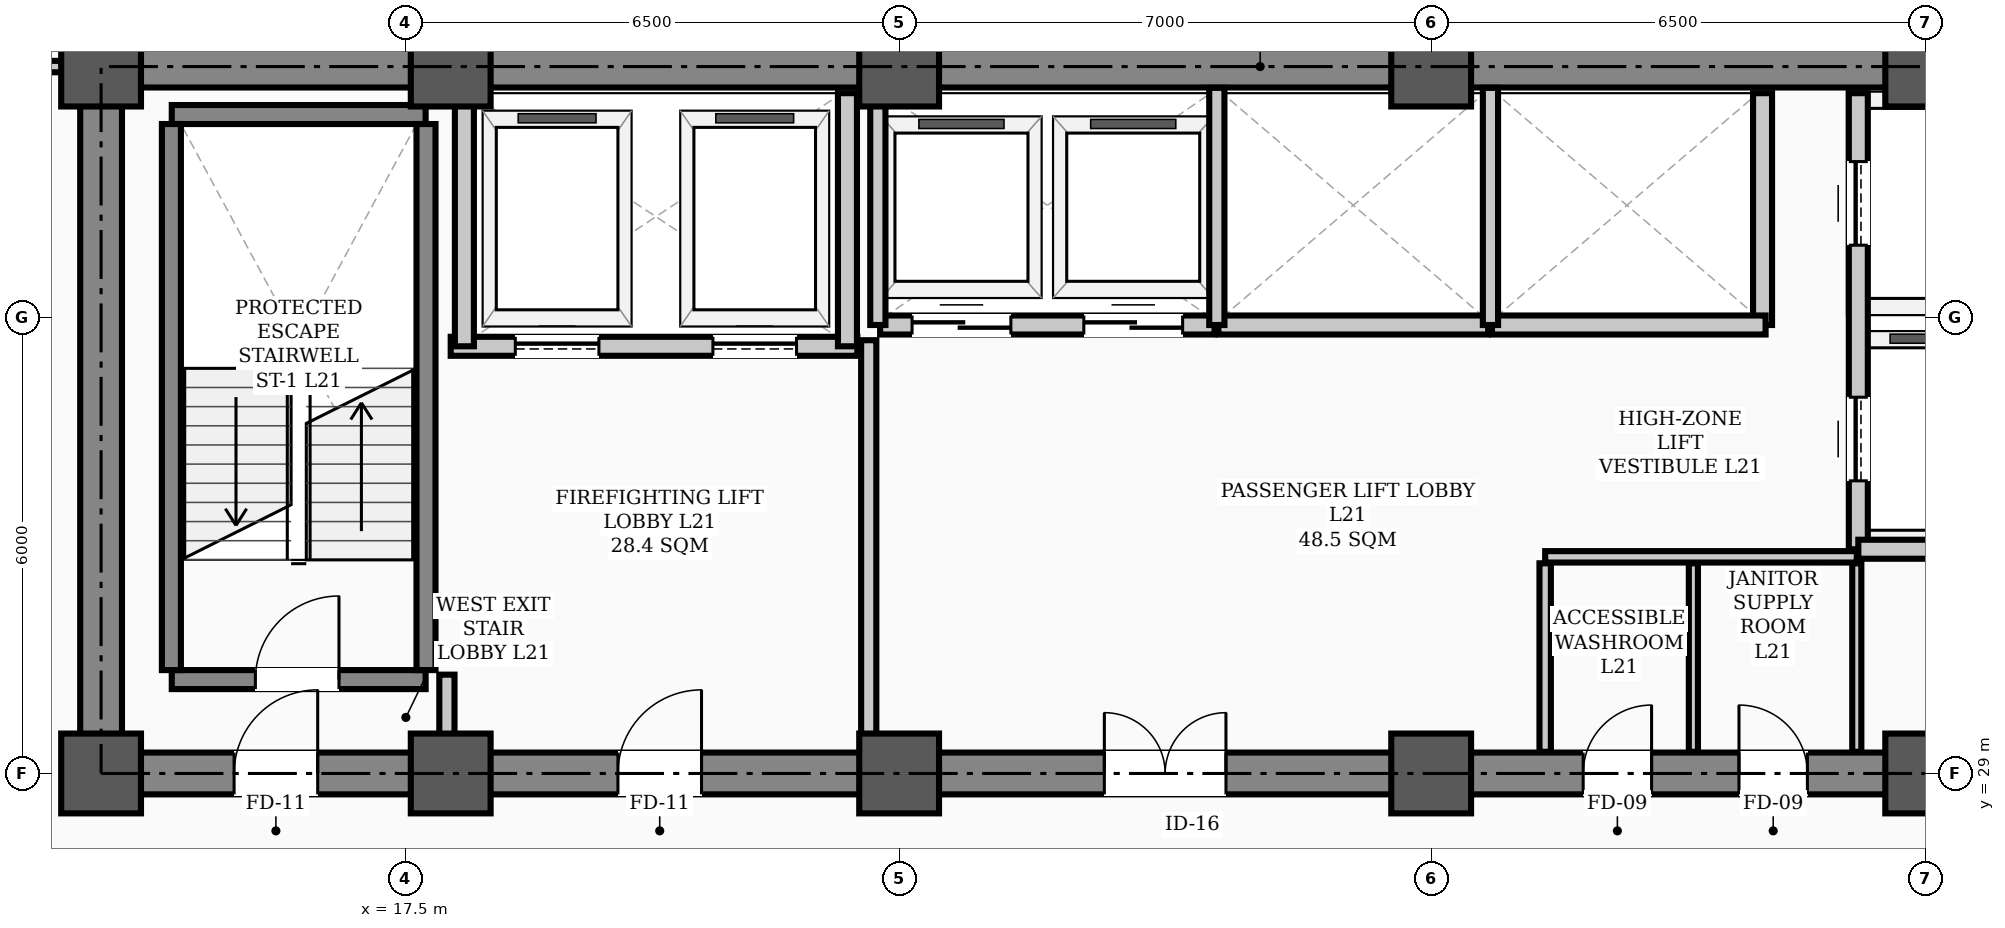
"""IFC4 building model, lengths in metres.
Left out: names, types, materials, properties, quantities, classifications, styles, units other than length and angle.
Written with IfcOpenShell. Run it as: python <this file> out.ifc"""

import sys

from ifc_helpers import new_model, si_unit, direction, frame, frame_2d, origin, origin_2d, place, context, subcontext, project, spatial, rectangle, hollow_rectangle, extrude, element, fill, save


model = new_model("IFC4")
c1 = context("Model", 3, precision=1e-05, world=origin(), true_north=direction((0.0, 1.0)))
c2 = subcontext(c1, "Body", "Model", "MODEL_VIEW")
j1 = project(units=[si_unit("LENGTHUNIT", "METRE"), si_unit("PLANEANGLEUNIT", "RADIAN")], contexts=[c1])
p1 = place(None, origin())
s1 = spatial("IfcSite", under=j1, at=p1, CompositionType="ELEMENT")
p2 = place(p1, origin())
s2 = spatial("IfcBuilding", under=s1, at=p2, CompositionType="ELEMENT")
p3 = place(p2, frame((0.0, 0.0, 85.0)))
s3 = spatial("IfcBuildingStorey", under=s2, at=p3, CompositionType="ELEMENT", Elevation=85.0)
for number, where, z_axis, x_axis in (
    (1, (13.5, 29.0, 0.0), (0.0, 0.0, 1.0), (1.0, 0.0, 0.0)),
    (2, (13.5, 38.3, 0.0), (0.0, 0.0, 1.0), (1.0, 0.0, 0.0)),
    (3, (18.1, 29.0, 0.0), (0.0, 0.0, 1.0), (1.0, 0.0, 0.0)),
    (4, (18.1, 38.3, 0.0), (0.0, 0.0, 1.0), (1.0, 0.0, 0.0)),
    (5, (24.0, 29.0, 0.0), (0.0, 0.0, 1.0), (1.0, 0.0, 0.0)),
    (6, (24.0, 38.3, 0.0), (0.0, 0.0, 1.0), (1.0, 0.0, 0.0)),
    (7, (31.0, 29.0, 0.0), (0.0, 0.0, 1.0), (1.0, 0.0, 0.0)),
    (8, (31.0, 38.3, 0.0), (0.0, 0.0, 1.0), (1.0, 0.0, 0.0)),
    (9, (37.5, 29.0, 0.0), (0.0, 0.0, 1.0), (1.0, 0.0, 0.0)),
    (10, (37.5, 38.3, 0.0), (0.0, 0.0, 1.0), (1.0, 0.0, 0.0)),
):
    element("IfcColumn", number, at=place(p3, frame(where, z_axis=z_axis, x_axis=x_axis)), inside=s3, PredefinedType="COLUMN", context=c2, shape_type="SweptSolid", body=[
        extrude(hollow_rectangle(XDim=1.05, YDim=1.05, WallThickness=0.038, InnerFilletRadius=0.019, OuterFilletRadius=0.057, at=origin_2d()), origin(), (0.0, 0.0, 1.0), 3.9),
    ])
p4 = place(p3, frame((13.5, 29.0, 0.0), z_axis=(0.0, 0.0, 1.0), x_axis=(1.0, 0.0, 0.0)))
e11 = element("IfcWall", 11, at=p4, inside=s3, PredefinedType="SHEAR", context=c2, shape_type="SweptSolid", body=[
    extrude(rectangle(XDim=30.5, YDim=0.55, at=frame_2d((15.25, 0.0))), origin(), (0.0, 0.0, 1.0), 3.72),
])
p5 = place(p4, frame((1.75, 0.0, 0.0)))
e12 = element("IfcOpeningElement", 12, at=p5, cuts=e11, PredefinedType="OPENING", context=c2, shape_type="SweptSolid", body=[
    extrude(rectangle(XDim=1.1, YDim=2.08, at=frame_2d((0.55, 1.04))), frame((0.0, 0.285, 0.0), z_axis=(0.0, -1.0, 0.0), x_axis=(1.0, 0.0, 0.0)), (0.0, 0.0, 1.0), 0.57),
])
p6 = place(p4, frame((26.7, 0.0, 0.0)))
e13 = element("IfcOpeningElement", 13, at=p6, cuts=e11, PredefinedType="OPENING", context=c2, shape_type="SweptSolid", body=[
    extrude(rectangle(XDim=1.1, YDim=2.08, at=frame_2d((0.55, 1.04))), frame((0.0, 0.285, 0.0), z_axis=(0.0, -1.0, 0.0), x_axis=(1.0, 0.0, 0.0)), (0.0, 0.0, 1.0), 0.57),
])
p7 = place(p4, frame((6.8, 0.0, 0.0)))
e14 = element("IfcOpeningElement", 14, at=p7, cuts=e11, PredefinedType="OPENING", context=c2, shape_type="SweptSolid", body=[
    extrude(rectangle(XDim=1.1, YDim=2.08, at=frame_2d((0.55, 1.04))), frame((0.0, 0.285, 0.0), z_axis=(0.0, -1.0, 0.0), x_axis=(1.0, 0.0, 0.0)), (0.0, 0.0, 1.0), 0.57),
])
p8 = place(p4, frame((13.2, 0.0, 0.0)))
e15 = element("IfcOpeningElement", 15, at=p8, cuts=e11, PredefinedType="OPENING", context=c2, shape_type="SweptSolid", body=[
    extrude(rectangle(XDim=1.6, YDim=2.08, at=frame_2d((0.8, 1.04))), frame((0.0, 0.285, 0.0), z_axis=(0.0, -1.0, 0.0), x_axis=(1.0, 0.0, 0.0)), (0.0, 0.0, 1.0), 0.57),
])
p9 = place(p4, frame((19.5, 0.0, 0.0)))
e16 = element("IfcOpeningElement", 16, at=p9, cuts=e11, PredefinedType="OPENING", context=c2, shape_type="SweptSolid", body=[
    extrude(rectangle(XDim=0.9, YDim=2.08, at=frame_2d((0.45, 1.04))), frame((0.0, 0.285, 0.0), z_axis=(0.0, -1.0, 0.0), x_axis=(1.0, 0.0, 0.0)), (0.0, 0.0, 1.0), 0.57),
])
p10 = place(p4, frame((21.55, 0.0, 0.0)))
e17 = element("IfcOpeningElement", 17, at=p10, cuts=e11, PredefinedType="OPENING", context=c2, shape_type="SweptSolid", body=[
    extrude(rectangle(XDim=0.9, YDim=2.08, at=frame_2d((0.45, 1.04))), frame((0.0, 0.285, 0.0), z_axis=(0.0, -1.0, 0.0), x_axis=(1.0, 0.0, 0.0)), (0.0, 0.0, 1.0), 0.57),
])
p11 = place(p3, frame((13.5, 38.3, 0.0), z_axis=(0.0, 0.0, 1.0), x_axis=(1.0, 0.0, 0.0)))
e18 = element("IfcWall", 18, at=p11, inside=s3, PredefinedType="SHEAR", context=c2, shape_type="SweptSolid", body=[
    extrude(rectangle(XDim=30.5, YDim=0.55, at=frame_2d((15.25, 0.0))), origin(), (0.0, 0.0, 1.0), 3.72),
])
p12 = place(p3, frame((13.5, 29.35, 0.0), z_axis=(0.0, 0.0, 1.0), x_axis=(0.0, 1.0, 0.0)))
e19 = element("IfcWall", 19, at=p12, inside=s3, PredefinedType="SHEAR", context=c2, shape_type="SweptSolid", body=[
    extrude(rectangle(XDim=8.6, YDim=0.55, at=frame_2d((4.3, 0.0))), origin(), (0.0, 0.0, 1.0), 3.72),
])
p13 = place(p3, frame((14.43, 30.235, 0.0), z_axis=(0.0, 0.0, 1.0), x_axis=(1.0, 0.0, 0.0)))
e20 = element("IfcWall", 20, at=p13, inside=s3, PredefinedType="STANDARD", context=c2, shape_type="SweptSolid", body=[
    extrude(rectangle(XDim=3.34, YDim=0.25, at=frame_2d((1.67, 0.0))), origin(), (0.0, 0.0, 1.0), 3.72),
])
p14 = place(p13, frame((1.1, 0.0, 0.0)))
e21 = element("IfcOpeningElement", 21, at=p14, cuts=e20, PredefinedType="OPENING", context=c2, shape_type="SweptSolid", body=[
    extrude(rectangle(XDim=1.1, YDim=2.08, at=frame_2d((0.55, 1.04))), frame((0.0, 0.135, 0.0), z_axis=(0.0, -1.0, 0.0), x_axis=(1.0, 0.0, 0.0)), (0.0, 0.0, 1.0), 0.27),
])
p15 = place(p3, frame((14.43, 37.669, 0.0), z_axis=(0.0, 0.0, 1.0), x_axis=(1.0, 0.0, 0.0)))
e22 = element("IfcWall", 22, at=p15, inside=s3, PredefinedType="STANDARD", context=c2, shape_type="SweptSolid", body=[
    extrude(rectangle(XDim=3.34, YDim=0.25, at=frame_2d((1.67, 0.0))), origin(), (0.0, 0.0, 1.0), 3.72),
])
for number, where, z_axis, x_axis in (
    (23, (14.425, 30.36, 0.0), (0.0, 0.0, 1.0), (0.0, 1.0, 0.0)),
    (24, (17.775, 30.36, 0.0), (0.0, 0.0, 1.0), (0.0, 1.0, 0.0)),
):
    element("IfcWall", number, at=place(p3, frame(where, z_axis=z_axis, x_axis=x_axis)), inside=s3, PredefinedType="STANDARD", context=c2, shape_type="SweptSolid", body=[
        extrude(rectangle(XDim=7.184, YDim=0.25, at=frame_2d((3.592, 0.0))), origin(), (0.0, 0.0, 1.0), 3.72),
    ])
p16 = place(p3, frame((18.1, 34.62, 0.0), z_axis=(0.0, 0.0, 1.0), x_axis=(1.0, 0.0, 0.0)))
e25 = element("IfcWall", 25, at=p16, inside=s3, PredefinedType="STANDARD", context=c2, shape_type="SweptSolid", body=[
    extrude(rectangle(XDim=5.35, YDim=0.25, at=frame_2d((2.675, 0.0))), origin(), (0.0, 0.0, 1.0), 3.72),
])
p17 = place(p16, frame((0.85, 0.0, 0.0)))
e26 = element("IfcOpeningElement", 26, at=p17, cuts=e25, PredefinedType="OPENING", context=c2, shape_type="SweptSolid", body=[
    extrude(rectangle(XDim=1.1, YDim=2.08, at=frame_2d((0.55, 1.04))), frame((0.0, 0.135, 0.0), z_axis=(0.0, -1.0, 0.0), x_axis=(1.0, 0.0, 0.0)), (0.0, 0.0, 1.0), 0.27),
])
p18 = place(p16, frame((3.45, 0.0, 0.0)))
e27 = element("IfcOpeningElement", 27, at=p18, cuts=e25, PredefinedType="OPENING", context=c2, shape_type="SweptSolid", body=[
    extrude(rectangle(XDim=1.1, YDim=2.08, at=frame_2d((0.55, 1.04))), frame((0.0, 0.135, 0.0), z_axis=(0.0, -1.0, 0.0), x_axis=(1.0, 0.0, 0.0)), (0.0, 0.0, 1.0), 0.27),
])
p19 = place(p3, frame((36.62, 31.95, 0.0), z_axis=(0.0, 0.0, 1.0), x_axis=(0.0, 1.0, 0.0)))
e28 = element("IfcWall", 28, at=p19, inside=s3, PredefinedType="STANDARD", context=c2, shape_type="SweptSolid", body=[
    extrude(rectangle(XDim=6.0, YDim=0.25, at=frame_2d((3.0, 0.0))), origin(), (0.0, 0.0, 1.0), 3.3),
])
p20 = place(p19, frame((0.9, 0.0, 0.0)))
e29 = element("IfcOpeningElement", 29, at=p20, cuts=e28, PredefinedType="OPENING", context=c2, shape_type="SweptSolid", body=[
    extrude(rectangle(XDim=1.1, YDim=2.08, at=frame_2d((0.55, 1.04))), frame((0.0, 0.135, 0.0), z_axis=(0.0, -1.0, 0.0), x_axis=(1.0, 0.0, 0.0)), (0.0, 0.0, 1.0), 0.27),
])
p21 = place(p19, frame((4.0, 0.0, 0.0)))
e30 = element("IfcOpeningElement", 30, at=p21, cuts=e28, PredefinedType="OPENING", context=c2, shape_type="SweptSolid", body=[
    extrude(rectangle(XDim=1.1, YDim=2.08, at=frame_2d((0.55, 1.04))), frame((0.0, 0.135, 0.0), z_axis=(0.0, -1.0, 0.0), x_axis=(1.0, 0.0, 0.0)), (0.0, 0.0, 1.0), 0.27),
])
p22 = place(p3, frame((36.62, 31.95, 0.0), z_axis=(0.0, 0.0, 1.0), x_axis=(1.0, 0.0, 0.0)))
e31 = element("IfcWall", 31, at=p22, inside=s3, PredefinedType="STANDARD", context=c2, shape_type="SweptSolid", body=[
    extrude(rectangle(XDim=1.9, YDim=0.25, at=frame_2d((0.95, 0.0))), origin(), (0.0, 0.0, 1.0), 3.48),
])
for number, where, z_axis, x_axis in (
    (32, (18.28, 34.62, 0.0), (0.0, 0.0, 1.0), (0.0, 1.0, 0.0)),
    (33, (23.32, 34.62, 0.0), (0.0, 0.0, 1.0), (0.0, 1.0, 0.0)),
):
    element("IfcWall", number, at=place(p3, frame(where, z_axis=z_axis, x_axis=x_axis)), inside=s3, PredefinedType="STANDARD", context=c2, shape_type="SweptSolid", body=[
        extrude(rectangle(XDim=3.33, YDim=0.25, at=frame_2d((1.665, 0.0))), origin(), (0.0, 0.0, 1.0), 3.3),
    ])
p23 = place(p3, frame((35.36, 34.9, 0.0), z_axis=(0.0, 0.0, 1.0), x_axis=(0.0, 1.0, 0.0)))
e34 = element("IfcWall", 34, at=p23, inside=s3, PredefinedType="STANDARD", context=c2, shape_type="SweptSolid", body=[
    extrude(rectangle(XDim=3.05, YDim=0.25, at=frame_2d((1.525, 0.0))), origin(), (0.0, 0.0, 1.0), 3.3),
])
p24 = place(p3, frame((23.75, 34.9, 0.0), z_axis=(0.0, 0.0, 1.0), x_axis=(1.0, 0.0, 0.0)))
e35 = element("IfcWall", 35, at=p24, inside=s3, PredefinedType="STANDARD", context=c2, shape_type="SweptSolid", body=[
    extrude(rectangle(XDim=4.4, YDim=0.25, at=frame_2d((2.2, 0.0))), origin(), (0.0, 0.0, 1.0), 3.72),
])
p25 = place(p24, frame((0.42, 0.0, 0.0)))
e36 = element("IfcOpeningElement", 36, at=p25, cuts=e35, PredefinedType="OPENING", context=c2, shape_type="SweptSolid", body=[
    extrude(rectangle(XDim=1.3, YDim=2.08, at=frame_2d((0.65, 1.04))), frame((0.0, 0.135, 0.0), z_axis=(0.0, -1.0, 0.0), x_axis=(1.0, 0.0, 0.0)), (0.0, 0.0, 1.0), 0.27),
])
p26 = place(p24, frame((2.68, 0.0, 0.0)))
e37 = element("IfcOpeningElement", 37, at=p26, cuts=e35, PredefinedType="OPENING", context=c2, shape_type="SweptSolid", body=[
    extrude(rectangle(XDim=1.3, YDim=2.08, at=frame_2d((0.65, 1.04))), frame((0.0, 0.135, 0.0), z_axis=(0.0, -1.0, 0.0), x_axis=(1.0, 0.0, 0.0)), (0.0, 0.0, 1.0), 0.27),
])
p27 = place(p3, frame((28.2, 34.9, 0.0), z_axis=(0.0, 0.0, 1.0), x_axis=(1.0, 0.0, 0.0)))
e38 = element("IfcWall", 38, at=p27, inside=s3, PredefinedType="STANDARD", context=c2, shape_type="SweptSolid", body=[
    extrude(rectangle(XDim=3.55, YDim=0.25, at=frame_2d((1.775, 0.0))), origin(), (0.0, 0.0, 1.0), 3.72),
])
p28 = place(p3, frame((31.8, 34.9, 0.0), z_axis=(0.0, 0.0, 1.0), x_axis=(1.0, 0.0, 0.0)))
e39 = element("IfcWall", 39, at=p28, inside=s3, PredefinedType="STANDARD", context=c2, shape_type="SweptSolid", body=[
    extrude(rectangle(XDim=3.6, YDim=0.25, at=frame_2d((1.8, 0.0))), origin(), (0.0, 0.0, 1.0), 3.72),
])
p29 = place(p3, frame((32.5, 31.85, 0.0), z_axis=(0.0, 0.0, 1.0), x_axis=(1.0, 0.0, 0.0)))
e40 = element("IfcWall", 40, at=p29, inside=s3, PredefinedType="PARTITIONING", context=c2, shape_type="SweptSolid", body=[
    extrude(rectangle(XDim=4.1, YDim=0.15, at=frame_2d((2.05, 0.0))), origin(), (0.0, 0.0, 1.0), 3.72),
])
p30 = place(p3, frame((7.81, 38.3, 0.0), z_axis=(0.0, 0.0, 1.0), x_axis=(1.0, 0.0, 0.0)))
e41 = element("IfcWall", 41, at=p30, inside=s3, PredefinedType="PARTITIONING", context=c2, shape_type="SweptSolid", body=[
    extrude(rectangle(XDim=5.69, YDim=0.15, at=frame_2d((2.845, 0.0))), origin(), (0.0, 0.0, 1.0), 3.0),
])
p31 = place(p3, frame((18.05, 29.285, 0.0), z_axis=(0.0, 0.0, 1.0), x_axis=(0.0, 1.0, 0.0)))
e42 = element("IfcWall", 42, at=p31, inside=s3, PredefinedType="STANDARD", context=c2, shape_type="SweptSolid", body=[
    extrude(rectangle(XDim=1.015, YDim=0.2, at=frame_2d((0.508, 0.0))), origin(), (0.0, 0.0, 1.0), 3.3),
])
p32 = place(p3, frame((23.6, 29.285, 0.0), z_axis=(0.0, 0.0, 1.0), x_axis=(0.0, 1.0, 0.0)))
e43 = element("IfcWall", 43, at=p32, inside=s3, PredefinedType="STANDARD", context=c2, shape_type="SweptSolid", body=[
    extrude(rectangle(XDim=5.415, YDim=0.2, at=frame_2d((2.708, 0.0))), origin(), (0.0, 0.0, 1.0), 3.1),
])
p33 = place(p3, frame((32.5, 29.285, 0.0), z_axis=(0.0, 0.0, 1.0), x_axis=(0.0, 1.0, 0.0)))
e44 = element("IfcWall", 44, at=p33, inside=s3, PredefinedType="PARTITIONING", context=c2, shape_type="SweptSolid", body=[
    extrude(rectangle(XDim=2.48, YDim=0.15, at=frame_2d((1.24, 0.0))), origin(), (0.0, 0.0, 1.0), 3.3),
])
for number, where, z_axis, x_axis in (
    (45, (36.6, 29.285, 0.0), (0.0, 0.0, 1.0), (0.0, 1.0, 0.0)),
    (46, (34.45, 29.285, 0.0), (0.0, 0.0, 1.0), (0.0, 1.0, 0.0)),
):
    element("IfcWall", number, at=place(p3, frame(where, z_axis=z_axis, x_axis=x_axis)), inside=s3, PredefinedType="PARTITIONING", context=c2, shape_type="SweptSolid", body=[
        extrude(rectangle(XDim=2.48, YDim=0.12, at=frame_2d((1.24, 0.0))), origin(), (0.0, 0.0, 1.0), 3.3),
    ])
p34 = place(p3, frame((23.72, 34.9, 0.0), z_axis=(0.0, 0.0, 1.0), x_axis=(0.0, 1.0, 0.0)))
e47 = element("IfcWall", 47, at=p34, inside=s3, PredefinedType="STANDARD", context=c2, shape_type="SweptSolid", body=[
    extrude(rectangle(XDim=3.12, YDim=0.2, at=frame_2d((1.56, 0.0))), origin(), (0.0, 0.0, 1.0), 3.1),
])
for number, where, z_axis, x_axis in (
    (48, (28.18, 34.9, 0.0), (0.0, 0.0, 1.0), (0.0, 1.0, 0.0)),
    (49, (31.78, 34.9, 0.0), (0.0, 0.0, 1.0), (0.0, 1.0, 0.0)),
):
    element("IfcWall", number, at=place(p3, frame(where, z_axis=z_axis, x_axis=x_axis)), inside=s3, PredefinedType="STANDARD", context=c2, shape_type="SweptSolid", body=[
        extrude(rectangle(XDim=3.12, YDim=0.2, at=frame_2d((1.56, 0.0))), origin(), (0.0, 0.0, 1.0), 3.3),
    ])
p35 = place(p14, origin())
e50 = element("IfcDoor", 50, at=p35, inside=s3, OperationType="SINGLE_SWING_RIGHT", PredefinedType="DOOR", context=c2, shape_type="SweptSolid", body=[
    extrude(rectangle(XDim=1.1, YDim=2.08, at=frame_2d((0.55, 1.04))), frame((0.0, 0.025, 0.0), z_axis=(0.0, -1.0, 0.0), x_axis=(1.0, 0.0, 0.0)), (0.0, 0.0, 1.0), 0.05),
])
fill(e21, e50)
p36 = place(p5, origin())
e51 = element("IfcDoor", 51, at=p36, inside=s3, OperationType="SINGLE_SWING_RIGHT", PredefinedType="DOOR", context=c2, shape_type="SweptSolid", body=[
    extrude(rectangle(XDim=1.1, YDim=2.08, at=frame_2d((0.55, 1.04))), frame((0.0, 0.025, 0.0), z_axis=(0.0, -1.0, 0.0), x_axis=(1.0, 0.0, 0.0)), (0.0, 0.0, 1.0), 0.05),
])
fill(e12, e51)
p37 = place(p7, origin())
e52 = element("IfcDoor", 52, at=p37, inside=s3, OperationType="SINGLE_SWING_RIGHT", PredefinedType="DOOR", context=c2, shape_type="SweptSolid", body=[
    extrude(rectangle(XDim=1.1, YDim=2.08, at=frame_2d((0.55, 1.04))), frame((0.0, 0.025, 0.0), z_axis=(0.0, -1.0, 0.0), x_axis=(1.0, 0.0, 0.0)), (0.0, 0.0, 1.0), 0.05),
])
fill(e14, e52)
p38 = place(p8, origin())
e53 = element("IfcDoor", 53, at=p38, inside=s3, OperationType="DOUBLE_DOOR_SINGLE_SWING", PredefinedType="DOOR", context=c2, shape_type="SweptSolid", body=[
    extrude(rectangle(XDim=1.6, YDim=2.08, at=frame_2d((0.8, 1.04))), frame((0.0, 0.025, 0.0), z_axis=(0.0, -1.0, 0.0), x_axis=(1.0, 0.0, 0.0)), (0.0, 0.0, 1.0), 0.05),
])
fill(e15, e53)
p39 = place(p9, origin())
e54 = element("IfcDoor", 54, at=p39, inside=s3, OperationType="SINGLE_SWING_RIGHT", PredefinedType="DOOR", context=c2, shape_type="SweptSolid", body=[
    extrude(rectangle(XDim=0.9, YDim=2.08, at=frame_2d((0.45, 1.04))), frame((0.0, 0.025, 0.0), z_axis=(0.0, -1.0, 0.0), x_axis=(1.0, 0.0, 0.0)), (0.0, 0.0, 1.0), 0.05),
])
fill(e16, e54)
p40 = place(p10, origin())
e55 = element("IfcDoor", 55, at=p40, inside=s3, OperationType="SINGLE_SWING_LEFT", PredefinedType="DOOR", context=c2, shape_type="SweptSolid", body=[
    extrude(rectangle(XDim=0.9, YDim=2.08, at=frame_2d((0.45, 1.04))), frame((0.0, 0.025, 0.0), z_axis=(0.0, -1.0, 0.0), x_axis=(1.0, 0.0, 0.0)), (0.0, 0.0, 1.0), 0.05),
])
fill(e17, e55)
p41 = place(p17, origin())
e56 = element("IfcDoor", 56, at=p41, inside=s3, OperationType="SLIDING_TO_LEFT", PredefinedType="DOOR", context=c2, shape_type="SweptSolid", body=[
    extrude(rectangle(XDim=1.1, YDim=2.08, at=frame_2d((0.55, 1.04))), frame((0.0, 0.025, 0.0), z_axis=(0.0, -1.0, 0.0), x_axis=(1.0, 0.0, 0.0)), (0.0, 0.0, 1.0), 0.05),
])
fill(e26, e56)
p42 = place(p18, origin())
e57 = element("IfcDoor", 57, at=p42, inside=s3, OperationType="SLIDING_TO_LEFT", PredefinedType="DOOR", context=c2, shape_type="SweptSolid", body=[
    extrude(rectangle(XDim=1.1, YDim=2.08, at=frame_2d((0.55, 1.04))), frame((0.0, 0.025, 0.0), z_axis=(0.0, -1.0, 0.0), x_axis=(1.0, 0.0, 0.0)), (0.0, 0.0, 1.0), 0.05),
])
fill(e27, e57)
p43 = place(p20, origin())
e58 = element("IfcDoor", 58, at=p43, inside=s3, OperationType="SLIDING_TO_LEFT", PredefinedType="DOOR", context=c2, shape_type="SweptSolid", body=[
    extrude(rectangle(XDim=1.1, YDim=2.08, at=frame_2d((0.55, 1.04))), frame((0.0, 0.025, 0.0), z_axis=(0.0, -1.0, 0.0), x_axis=(1.0, 0.0, 0.0)), (0.0, 0.0, 1.0), 0.05),
])
fill(e29, e58)
p44 = place(p21, origin())
e59 = element("IfcDoor", 59, at=p44, inside=s3, OperationType="SLIDING_TO_LEFT", PredefinedType="DOOR", context=c2, shape_type="SweptSolid", body=[
    extrude(rectangle(XDim=1.1, YDim=2.08, at=frame_2d((0.55, 1.04))), frame((0.0, 0.025, 0.0), z_axis=(0.0, -1.0, 0.0), x_axis=(1.0, 0.0, 0.0)), (0.0, 0.0, 1.0), 0.05),
])
fill(e30, e59)
p45 = place(p25, origin())
e60 = element("IfcDoor", 60, at=p45, inside=s3, OperationType="DOUBLE_DOOR_SLIDING", PredefinedType="DOOR", context=c2, shape_type="SweptSolid", body=[
    extrude(rectangle(XDim=1.3, YDim=2.08, at=frame_2d((0.65, 1.04))), frame((0.0, 0.025, 0.0), z_axis=(0.0, -1.0, 0.0), x_axis=(1.0, 0.0, 0.0)), (0.0, 0.0, 1.0), 0.05),
])
fill(e36, e60)
p46 = place(p26, origin())
e61 = element("IfcDoor", 61, at=p46, inside=s3, OperationType="DOUBLE_DOOR_SLIDING", PredefinedType="DOOR", context=c2, shape_type="SweptSolid", body=[
    extrude(rectangle(XDim=1.3, YDim=2.08, at=frame_2d((0.65, 1.04))), frame((0.0, 0.025, 0.0), z_axis=(0.0, -1.0, 0.0), x_axis=(1.0, 0.0, 0.0)), (0.0, 0.0, 1.0), 0.05),
])
fill(e37, e61)
save(model, sys.argv[1])
